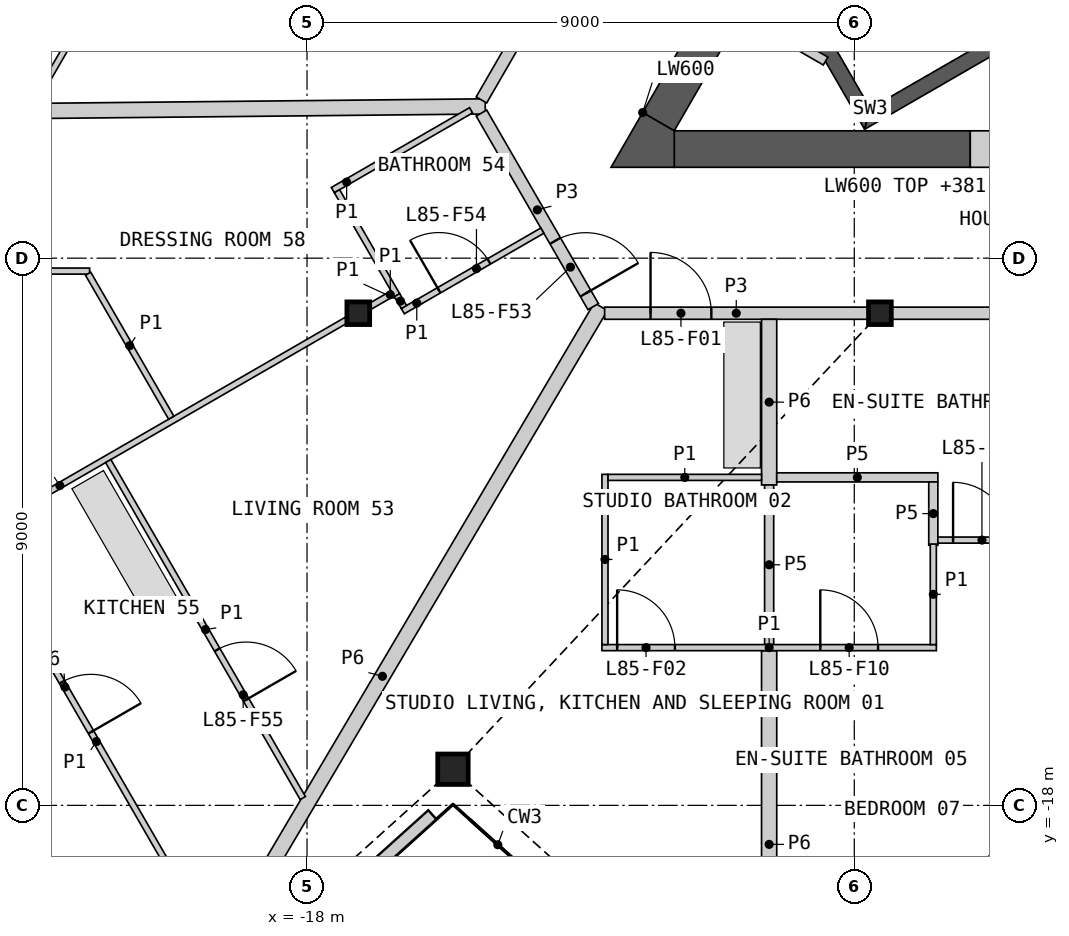
"""IFC4 building model, lengths in metres.
Left out: names, types, materials, properties, quantities, classifications, styles, units other than length and angle.
Written with IfcOpenShell. Run it as: python <this file> out.ifc"""

import sys

from ifc_helpers import new_model, si_unit, direction, frame, frame_2d, origin, origin_2d, place, context, subcontext, project, spatial, polyline, rectangle, hollow_rectangle, i_section, outline, extrude, element, fill, save


model = new_model("IFC4")
c1 = context("Model", 3, precision=1e-05, world=origin(), true_north=direction((0.0, 1.0)))
c2 = subcontext(c1, "Body", "Model", "MODEL_VIEW")
j1 = project(units=[si_unit("LENGTHUNIT", "METRE"), si_unit("PLANEANGLEUNIT", "RADIAN")], contexts=[c1])
p1 = place(None, origin())
s1 = spatial("IfcSite", under=j1, at=p1, CompositionType="ELEMENT")
p2 = place(p1, origin())
s2 = spatial("IfcBuilding", under=s1, at=p2, CompositionType="ELEMENT")
p3 = place(p2, frame((0.0, 0.0, 378.0)))
s3 = spatial("IfcBuildingStorey", under=s2, at=p3, CompositionType="ELEMENT", Elevation=378.0)
p4 = place(p3, frame((-15.6, -17.406, 0.0), z_axis=(0.0, 0.0, 1.0), x_axis=(1.0, 0.0, 0.0)))
e1 = element("IfcColumn", 1, at=p4, inside=s3, PredefinedType="COLUMN", context=c2, shape_type="SweptSolid", body=[
    extrude(hollow_rectangle(XDim=0.5, YDim=0.5, WallThickness=0.03, at=origin_2d()), origin(), (0.0, 0.0, 1.0), 3.4),
])
for number, where, z_axis, x_axis in (
    (2, (-17.157, -9.906, 0.0), (0.0, 0.0, 1.0), (1.0, 0.0, 0.0)),
    (3, (-8.578, -9.906, 0.0), (0.0, 0.0, 1.0), (1.0, 0.0, 0.0)),
):
    element("IfcColumn", number, at=place(p3, frame(where, z_axis=z_axis, x_axis=x_axis)), inside=s3, PredefinedType="COLUMN", context=c2, shape_type="SweptSolid", body=[
        extrude(i_section(OverallWidth=0.374, OverallDepth=0.372, WebThickness=0.016, FlangeThickness=0.026, at=origin_2d()), origin(), (0.0, 0.0, 1.0), 3.4),
    ])
p5 = place(p3, frame((-20.595, -22.346, 0.0), z_axis=(0.0, 0.0, 1.0), x_axis=(0.743137181878, 0.669139095339, 0.0)))
e4 = element("IfcWall", 4, at=p5, inside=s3, PredefinedType="SOLIDWALL", context=c2, shape_type="SweptSolid", body=[
    extrude(rectangle(XDim=6.265, YDim=0.2, at=frame_2d((3.133, 0.0))), origin(), (0.0, 0.0, 1.0), 2.634),
])
p6 = place(p5, frame((2.333, 0.0, 0.0)))
e5 = element("IfcOpeningElement", 5, at=p6, cuts=e4, PredefinedType="OPENING", context=c2, shape_type="SweptSolid", body=[
    extrude(rectangle(XDim=1.6, YDim=2.25, at=frame_2d((0.8, 1.125))), frame((0.0, 0.11, 0.0), z_axis=(0.0, -1.0, 0.0), x_axis=(1.0, 0.0, 0.0)), (0.0, 0.0, 1.0), 0.22),
])
p7 = place(p3, frame((-10.195, -22.346, 0.0), z_axis=(0.0, 0.0, 1.0), x_axis=(0.74313432117, 0.66914227239, 0.0)))
e6 = element("IfcWall", 6, at=p7, inside=s3, PredefinedType="SOLIDWALL", context=c2, shape_type="SweptSolid", body=[
    extrude(rectangle(XDim=6.609, YDim=0.2, at=frame_2d((3.304, 0.0))), origin(), (0.0, 0.0, 1.0), 2.634),
])
p8 = place(p7, frame((2.333, 0.0, 0.0)))
e7 = element("IfcOpeningElement", 7, at=p8, cuts=e6, PredefinedType="OPENING", context=c2, shape_type="SweptSolid", body=[
    extrude(rectangle(XDim=1.6, YDim=2.25, at=frame_2d((0.8, 1.125))), frame((0.0, 0.11, 0.0), z_axis=(0.0, -1.0, 0.0), x_axis=(1.0, 0.0, 0.0)), (0.0, 0.0, 1.0), 0.22),
])
p9 = place(p3, origin())
e8 = element("IfcWall", 8, at=p9, inside=s3, PredefinedType="SHEAR", context=c2, shape_type="SweptSolid", body=[
    extrude(outline(polyline([(-10.374, -4.206), (-8.83, -6.881), (-8.738, -6.539), (-10.032, -4.298), (-10.374, -4.206)])), origin(), (0.0, 0.0, 1.0), 3.1),
])
p10 = place(p3, origin())
e9 = element("IfcWall", 9, at=p10, inside=s3, PredefinedType="SHEAR", context=c2, shape_type="SweptSolid", body=[
    extrude(outline(polyline([(-8.738, -6.539), (-8.83, -6.881), (-3.763, -3.956), (-3.888, -3.739), (-8.738, -6.539)])), origin(), (0.0, 0.0, 1.0), 3.1),
])
p11 = place(p3, frame((-10.842, -4.967, 0.0), z_axis=(0.0, 0.0, 1.0), x_axis=(0.866098216386, -0.499873863663, 0.0)))
e10 = element("IfcWall", 10, at=p11, inside=s3, PredefinedType="PARTITIONING", context=c2, shape_type="SweptSolid", body=[
    extrude(rectangle(XDim=1.582, YDim=0.15, at=frame_2d((0.791, 0.0))), origin(), (0.0, 0.0, 1.0), 3.1),
])
p12 = place(p3, frame((-11.961, -7.206, 0.0), z_axis=(0.0, 0.0, 1.0), x_axis=(1.0, 0.0, 0.0)))
e11 = element("IfcWall", 11, at=p12, inside=s3, PredefinedType="SHEAR", context=c2, shape_type="SweptSolid", body=[
    extrude(rectangle(XDim=4.868, YDim=0.6, at=frame_2d((2.434, 0.0))), origin(), (0.0, 0.0, 1.0), 3.1),
])
p13 = place(p3, frame((-9.941, -2.807, 0.0), z_axis=(0.0, 0.0, 1.0), x_axis=(-0.500020646047, -0.866013483456, 0.0)))
e12 = element("IfcWall", 12, at=p13, inside=s3, PredefinedType="SHEAR", context=c2, shape_type="SweptSolid", body=[
    extrude(rectangle(XDim=4.559, YDim=0.6, at=frame_2d((2.28, 0.0))), origin(), (0.0, 0.0, 1.0), 3.1),
])
p14 = place(p3, origin())
e13 = element("IfcWall", 13, at=p14, inside=s3, PredefinedType="SHEAR", context=c2, shape_type="SweptSolid", body=[
    extrude(outline(polyline([(-12.48, -6.606), (-11.961, -6.906), (-11.961, -7.506), (-13.0, -7.506), (-12.48, -6.606)])), origin(), (0.0, 0.0, 1.0), 3.1),
])
p15 = place(p3, frame((-7.092, -7.206, 0.0), z_axis=(0.0, 0.0, 1.0), x_axis=(1.0, 0.0, 0.0)))
e14 = element("IfcWall", 14, at=p15, inside=s3, PredefinedType="SHEAR", context=c2, shape_type="SweptSolid", body=[
    extrude(rectangle(XDim=2.2, YDim=0.6, at=frame_2d((1.1, 0.0))), origin(), (0.0, 0.0, 1.0), 3.1),
])
p16 = place(p15, frame((0.6, 0.0, 0.0)))
e15 = element("IfcOpeningElement", 15, at=p16, cuts=e14, PredefinedType="OPENING", context=c2, shape_type="SweptSolid", body=[
    extrude(rectangle(XDim=1.0, YDim=2.1, at=frame_2d((0.5, 1.05))), frame((0.0, 0.31, 0.0), z_axis=(0.0, -1.0, 0.0), x_axis=(1.0, 0.0, 0.0)), (0.0, 0.0, 1.0), 0.62),
])
p17 = place(p3, frame((-29.883, -6.654, 0.0), z_axis=(0.0, 0.0, 1.0), x_axis=(0.999949143254, 0.010085182526, 0.0)))
e16 = element("IfcWall", 16, at=p17, inside=s3, PredefinedType="PARTITIONING", context=c2, shape_type="SweptSolid", body=[
    extrude(rectangle(XDim=14.815, YDim=0.25, at=frame_2d((7.408, 0.0))), origin(), (0.0, 0.0, 1.0), 2.33),
])
p18 = place(p3, frame((-20.351, -21.956, 0.0), z_axis=(0.0, 0.0, 1.0), x_axis=(0.508713003719, 0.860936164793, 0.0)))
e17 = element("IfcWall", 17, at=p18, inside=s3, PredefinedType="PARTITIONING", context=c2, shape_type="SweptSolid", body=[
    extrude(rectangle(XDim=14.122, YDim=0.25, at=frame_2d((7.061, 0.0))), origin(), (0.0, 0.0, 1.0), 2.33),
])
p19 = place(p3, frame((-8.382, -9.906, 0.0), z_axis=(0.0, 0.0, 1.0), x_axis=(1.0, 0.0, 0.0)))
e18 = element("IfcWall", 18, at=p19, inside=s3, PredefinedType="PARTITIONING", context=c2, shape_type="SweptSolid", body=[
    extrude(rectangle(XDim=8.185, YDim=0.2, at=frame_2d((4.092, 0.0))), origin(), (0.0, 0.0, 1.0), 3.1),
])
p20 = place(p19, frame((6.023, 0.0, 0.0)))
e19 = element("IfcOpeningElement", 19, at=p20, cuts=e18, PredefinedType="OPENING", context=c2, shape_type="SweptSolid", body=[
    extrude(rectangle(XDim=1.0, YDim=2.1, at=frame_2d((0.5, 1.05))), frame((0.0, 0.11, 0.0), z_axis=(0.0, -1.0, 0.0), x_axis=(1.0, 0.0, 0.0)), (0.0, 0.0, 1.0), 0.22),
])
p21 = place(p3, frame((-10.4, -21.828, 0.0), z_axis=(0.0, 0.0, 1.0), x_axis=(0.0, 1.0, 0.0)))
e20 = element("IfcWall", 20, at=p21, inside=s3, PredefinedType="PARTITIONING", context=c2, shape_type="SweptSolid", body=[
    extrude(rectangle(XDim=6.372, YDim=0.25, at=frame_2d((3.186, 0.0))), origin(), (0.0, 0.0, 1.0), 2.33),
])
p22 = place(p3, frame((-13.106, -9.906, 0.0), z_axis=(0.0, 0.0, 1.0), x_axis=(1.0, 0.0, 0.0)))
e21 = element("IfcWall", 21, at=p22, inside=s3, PredefinedType="PARTITIONING", context=c2, shape_type="SweptSolid", body=[
    extrude(rectangle(XDim=4.331, YDim=0.2, at=frame_2d((2.165, 0.0))), origin(), (0.0, 0.0, 1.0), 3.1),
])
p23 = place(p22, frame((0.755, 0.0, 0.0)))
e22 = element("IfcOpeningElement", 22, at=p23, cuts=e21, PredefinedType="OPENING", context=c2, shape_type="SweptSolid", body=[
    extrude(rectangle(XDim=1.0, YDim=2.1, at=frame_2d((0.5, 1.05))), frame((0.0, 0.11, 0.0), z_axis=(0.0, -1.0, 0.0), x_axis=(1.0, 0.0, 0.0)), (0.0, 0.0, 1.0), 0.22),
])
p24 = place(p3, frame((-15.131, -6.397, 0.0), z_axis=(0.0, 0.0, 1.0), x_axis=(0.499986217557, 0.866033360935, 0.0)))
e23 = element("IfcWall", 23, at=p24, inside=s3, PredefinedType="PARTITIONING", context=c2, shape_type="SweptSolid", body=[
    extrude(rectangle(XDim=4.3, YDim=0.2, at=frame_2d((2.15, 0.0))), origin(), (0.0, 0.0, 1.0), 3.1),
])
p25 = place(p3, frame((-15.131, -6.614, 0.0), z_axis=(0.0, 0.0, 1.0), x_axis=(0.499967746641, -0.866044024469, 0.0)))
e24 = element("IfcWall", 24, at=p25, inside=s3, PredefinedType="PARTITIONING", context=c2, shape_type="SweptSolid", body=[
    extrude(rectangle(XDim=3.676, YDim=0.2, at=frame_2d((1.838, 0.0))), origin(), (0.0, 0.0, 1.0), 3.1),
])
p26 = place(p25, frame((2.426, 0.0, 0.0)))
e25 = element("IfcOpeningElement", 25, at=p26, cuts=e24, PredefinedType="OPENING", context=c2, shape_type="SweptSolid", body=[
    extrude(rectangle(XDim=1.0, YDim=2.1, at=frame_2d((0.5, 1.05))), frame((0.0, 0.11, 0.0), z_axis=(0.0, -1.0, 0.0), x_axis=(1.0, 0.0, 0.0)), (0.0, 0.0, 1.0), 0.22),
])
p27 = place(p3, frame((-10.4, -12.731, 0.0), z_axis=(0.0, 0.0, 1.0), x_axis=(0.0, 1.0, 0.0)))
e26 = element("IfcWall", 26, at=p27, inside=s3, PredefinedType="PARTITIONING", context=c2, shape_type="SweptSolid", body=[
    extrude(rectangle(XDim=2.725, YDim=0.25, at=frame_2d((1.363, 0.0))), origin(), (0.0, 0.0, 1.0), 2.33),
])
p28 = place(p3, frame((-10.4, -15.356, 0.0), z_axis=(0.0, 0.0, 1.0), x_axis=(0.0, 1.0, 0.0)))
e27 = element("IfcWall", 27, at=p28, inside=s3, PredefinedType="PLUMBINGWALL", context=c2, shape_type="SweptSolid", body=[
    extrude(rectangle(XDim=2.625, YDim=0.15, at=frame_2d((1.312, 0.0))), origin(), (0.0, 0.0, 1.0), 2.33),
])
p29 = place(p3, frame((-10.275, -12.606, 0.0), z_axis=(0.0, 0.0, 1.0), x_axis=(1.0, 0.0, 0.0)))
e28 = element("IfcWall", 28, at=p29, inside=s3, PredefinedType="PLUMBINGWALL", context=c2, shape_type="SweptSolid", body=[
    extrude(rectangle(XDim=2.65, YDim=0.15, at=frame_2d((1.325, 0.0))), origin(), (0.0, 0.0, 1.0), 2.33),
])
p30 = place(p3, frame((-7.7, -13.722, 0.0), z_axis=(0.0, 0.0, 1.0), x_axis=(0.0, 1.0, 0.0)))
e29 = element("IfcWall", 29, at=p30, inside=s3, PredefinedType="PLUMBINGWALL", context=c2, shape_type="SweptSolid", body=[
    extrude(rectangle(XDim=1.042, YDim=0.15, at=frame_2d((0.521, 0.0))), origin(), (0.0, 0.0, 1.0), 2.33),
])
p31 = place(p3, frame((-26.777, -15.46, 0.0), z_axis=(0.0, 0.0, 1.0), x_axis=(0.866019680922, 0.500009912158, 0.0)))
e30 = element("IfcWall", 30, at=p31, inside=s3, PredefinedType="PARTITIONING", context=c2, shape_type="SweptSolid", body=[
    extrude(rectangle(XDim=10.881, YDim=0.1, at=frame_2d((5.44, 0.0))), origin(), (0.0, 0.0, 1.0), 2.33),
])
p32 = place(p31, frame((1.454, 0.0, 0.0)))
e31 = element("IfcOpeningElement", 31, at=p32, cuts=e30, PredefinedType="OPENING", context=c2, shape_type="SweptSolid", body=[
    extrude(rectangle(XDim=0.95, YDim=2.1, at=frame_2d((0.475, 1.05))), frame((0.0, 0.06, 0.0), z_axis=(0.0, -1.0, 0.0), x_axis=(1.0, 0.0, 0.0)), (0.0, 0.0, 1.0), 0.12),
])
p33 = place(p3, frame((-23.413, -13.575, 0.0), z_axis=(0.0, 0.0, 1.0), x_axis=(0.499998958472, -0.86602600511, 0.0)))
e32 = element("IfcWall", 32, at=p33, inside=s3, PredefinedType="PARTITIONING", context=c2, shape_type="SweptSolid", body=[
    extrude(rectangle(XDim=7.796, YDim=0.1, at=frame_2d((3.898, 0.0))), origin(), (0.0, 0.0, 1.0), 2.33),
])
p34 = place(p33, frame((2.768, 0.0, 0.0)))
e33 = element("IfcOpeningElement", 33, at=p34, cuts=e32, PredefinedType="OPENING", context=c2, shape_type="SweptSolid", body=[
    extrude(rectangle(XDim=0.95, YDim=2.1, at=frame_2d((0.475, 1.05))), frame((0.0, 0.06, 0.0), z_axis=(0.0, -1.0, 0.0), x_axis=(1.0, 0.0, 0.0)), (0.0, 0.0, 1.0), 0.12),
])
p35 = place(p3, frame((-22.505, -6.472, 0.0), z_axis=(0.0, 0.0, 1.0), x_axis=(0.499999516514, 0.866025682925, 0.0)))
e34 = element("IfcWall", 34, at=p35, inside=s3, PredefinedType="PARTITIONING", context=c2, shape_type="SweptSolid", body=[
    extrude(rectangle(XDim=6.407, YDim=0.1, at=frame_2d((3.204, 0.0))), origin(), (0.0, 0.0, 1.0), 2.33),
])
p36 = place(p35, frame((2.981, 0.0, 0.0)))
e35 = element("IfcOpeningElement", 35, at=p36, cuts=e34, PredefinedType="OPENING", context=c2, shape_type="SweptSolid", body=[
    extrude(rectangle(XDim=0.95, YDim=2.1, at=frame_2d((0.475, 1.05))), frame((0.0, 0.06, 0.0), z_axis=(0.0, -1.0, 0.0), x_axis=(1.0, 0.0, 0.0)), (0.0, 0.0, 1.0), 0.12),
])
p37 = place(p3, frame((-21.269, -12.337, 0.0), z_axis=(0.0, 0.0, 1.0), x_axis=(0.499983315828, -0.866035036182, 0.0)))
e36 = element("IfcWall", 36, at=p37, inside=s3, PredefinedType="PARTITIONING", context=c2, shape_type="SweptSolid", body=[
    extrude(rectangle(XDim=6.4, YDim=0.1, at=frame_2d((3.2, 0.0))), origin(), (0.0, 0.0, 1.0), 2.33),
])
p38 = place(p37, frame((3.584, 0.0, 0.0)))
e37 = element("IfcOpeningElement", 37, at=p38, cuts=e36, PredefinedType="OPENING", context=c2, shape_type="SweptSolid", body=[
    extrude(rectangle(XDim=0.95, YDim=2.1, at=frame_2d((0.475, 1.05))), frame((0.0, 0.06, 0.0), z_axis=(0.0, -1.0, 0.0), x_axis=(1.0, 0.0, 0.0)), (0.0, 0.0, 1.0), 0.12),
])
p39 = place(p3, frame((-13.15, -15.406, 0.0), z_axis=(0.0, 0.0, 1.0), x_axis=(1.0, 0.0, 0.0)))
e38 = element("IfcWall", 38, at=p39, inside=s3, PredefinedType="PARTITIONING", context=c2, shape_type="SweptSolid", body=[
    extrude(rectangle(XDim=5.5, YDim=0.1, at=frame_2d((2.75, 0.0))), origin(), (0.0, 0.0, 1.0), 2.33),
])
p40 = place(p39, frame((0.25, 0.0, 0.0)))
e39 = element("IfcOpeningElement", 39, at=p40, cuts=e38, PredefinedType="OPENING", context=c2, shape_type="SweptSolid", body=[
    extrude(rectangle(XDim=0.95, YDim=2.1, at=frame_2d((0.475, 1.05))), frame((0.0, 0.06, 0.0), z_axis=(0.0, -1.0, 0.0), x_axis=(1.0, 0.0, 0.0)), (0.0, 0.0, 1.0), 0.12),
])
p41 = place(p39, frame((3.591, 0.0, 0.0)))
e40 = element("IfcOpeningElement", 40, at=p41, cuts=e38, PredefinedType="OPENING", context=c2, shape_type="SweptSolid", body=[
    extrude(rectangle(XDim=0.95, YDim=2.1, at=frame_2d((0.475, 1.05))), frame((0.0, 0.06, 0.0), z_axis=(0.0, -1.0, 0.0), x_axis=(1.0, 0.0, 0.0)), (0.0, 0.0, 1.0), 0.12),
])
p42 = place(p3, frame((-24.801, -9.212, 0.0), z_axis=(0.0, 0.0, 1.0), x_axis=(1.0, 0.0, 0.0)))
e41 = element("IfcWall", 41, at=p42, inside=s3, PredefinedType="PARTITIONING", context=c2, shape_type="SweptSolid", body=[
    extrude(rectangle(XDim=3.226, YDim=0.1, at=frame_2d((1.613, 0.0))), origin(), (0.0, 0.0, 1.0), 2.33),
])
p43 = place(p42, frame((0.354, 0.0, 0.0)))
e42 = element("IfcOpeningElement", 42, at=p43, cuts=e41, PredefinedType="OPENING", context=c2, shape_type="SweptSolid", body=[
    extrude(rectangle(XDim=0.95, YDim=2.1, at=frame_2d((0.475, 1.05))), frame((0.0, 0.06, 0.0), z_axis=(0.0, -1.0, 0.0), x_axis=(1.0, 0.0, 0.0)), (0.0, 0.0, 1.0), 0.12),
])
p44 = place(p3, frame((-21.6, -9.256, 0.0), z_axis=(0.0, 0.0, 1.0), x_axis=(0.500018733116, -0.866014587945, 0.0)))
e43 = element("IfcWall", 43, at=p44, inside=s3, PredefinedType="PARTITIONING", context=c2, shape_type="SweptSolid", body=[
    extrude(rectangle(XDim=2.734, YDim=0.1, at=frame_2d((1.367, 0.0))), origin(), (0.0, 0.0, 1.0), 2.33),
])
p45 = place(p3, frame((-13.1, -15.356, 0.0), z_axis=(0.0, 0.0, 1.0), x_axis=(0.0, 1.0, 0.0)))
e44 = element("IfcWall", 44, at=p45, inside=s3, PredefinedType="PARTITIONING", context=c2, shape_type="SweptSolid", body=[
    extrude(rectangle(XDim=2.8, YDim=0.1, at=frame_2d((1.4, 0.0))), origin(), (0.0, 0.0, 1.0), 2.33),
])
p46 = place(p3, frame((-17.575, -7.881, 0.0), z_axis=(0.0, 0.0, 1.0), x_axis=(0.866036909293, 0.499980071345, 0.0)))
e45 = element("IfcWall", 45, at=p46, inside=s3, PredefinedType="PARTITIONING", context=c2, shape_type="SweptSolid", body=[
    extrude(rectangle(XDim=2.625, YDim=0.1, at=frame_2d((1.312, 0.0))), origin(), (0.0, 0.0, 1.0), 2.33),
])
p47 = place(p3, frame((-13.05, -12.606, 0.0), z_axis=(0.0, 0.0, 1.0), x_axis=(1.0, 0.0, 0.0)))
e46 = element("IfcWall", 46, at=p47, inside=s3, PredefinedType="PARTITIONING", context=c2, shape_type="SweptSolid", body=[
    extrude(rectangle(XDim=2.525, YDim=0.1, at=frame_2d((1.263, 0.0))), origin(), (0.0, 0.0, 1.0), 2.33),
])
p48 = place(p3, frame((-16.425, -9.872, 0.0), z_axis=(0.0, 0.0, 1.0), x_axis=(0.86603978909, 0.499975083092, 0.0)))
e47 = element("IfcWall", 47, at=p48, inside=s3, PredefinedType="PARTITIONING", context=c2, shape_type="SweptSolid", body=[
    extrude(rectangle(XDim=2.649, YDim=0.1, at=frame_2d((1.325, 0.0))), origin(), (0.0, 0.0, 1.0), 2.33),
])
p49 = place(p48, frame((0.686, 0.0, 0.0)))
e48 = element("IfcOpeningElement", 48, at=p49, cuts=e47, PredefinedType="OPENING", context=c2, shape_type="SweptSolid", body=[
    extrude(rectangle(XDim=0.95, YDim=2.1, at=frame_2d((0.475, 1.05))), frame((0.0, 0.06, 0.0), z_axis=(0.0, -1.0, 0.0), x_axis=(1.0, 0.0, 0.0)), (0.0, 0.0, 1.0), 0.12),
])
p50 = place(p3, frame((-7.625, -13.637, 0.0), z_axis=(0.0, 0.0, 1.0), x_axis=(1.0, 0.0, 0.0)))
e49 = element("IfcWall", 49, at=p50, inside=s3, PredefinedType="PARTITIONING", context=c2, shape_type="SweptSolid", body=[
    extrude(rectangle(XDim=2.375, YDim=0.1, at=frame_2d((1.188, 0.0))), origin(), (0.0, 0.0, 1.0), 2.33),
])
p51 = place(p50, frame((0.25, 0.0, 0.0)))
e50 = element("IfcOpeningElement", 50, at=p51, cuts=e49, PredefinedType="OPENING", context=c2, shape_type="SweptSolid", body=[
    extrude(rectangle(XDim=0.95, YDim=2.1, at=frame_2d((0.475, 1.05))), frame((0.0, 0.06, 0.0), z_axis=(0.0, -1.0, 0.0), x_axis=(1.0, 0.0, 0.0)), (0.0, 0.0, 1.0), 0.12),
])
p52 = place(p3, frame((-17.507, -7.899, 0.0), z_axis=(0.0, 0.0, 1.0), x_axis=(0.500011643316, -0.866018681408, 0.0)))
e51 = element("IfcWall", 51, at=p52, inside=s3, PredefinedType="PARTITIONING", context=c2, shape_type="SweptSolid", body=[
    extrude(rectangle(XDim=1.973, YDim=0.1, at=frame_2d((0.987, 0.0))), origin(), (0.0, 0.0, 1.0), 2.33),
])
p53 = place(p3, frame((-7.7, -15.356, 0.0), z_axis=(0.0, 0.0, 1.0), x_axis=(0.0, 1.0, 0.0)))
e52 = element("IfcWall", 52, at=p53, inside=s3, PredefinedType="PARTITIONING", context=c2, shape_type="SweptSolid", body=[
    extrude(rectangle(XDim=1.654, YDim=0.1, at=frame_2d((0.827, 0.0))), origin(), (0.0, 0.0, 1.0), 2.33),
])
p54 = place(p3, frame((-16.96, -9.792, 0.0), z_axis=(0.0, 0.0, 1.0), x_axis=(0.866137484628, 0.499805820016, 0.0)))
e53 = element("IfcWall", 53, at=p54, inside=s3, PredefinedType="PARTITIONING", context=c2, shape_type="SweptSolid", body=[
    extrude(rectangle(XDim=0.423, YDim=0.1, at=frame_2d((0.211, 0.0))), origin(), (0.0, 0.0, 1.0), 2.33),
])
p55 = place(p3, frame((-16.519, -9.61, 0.0), z_axis=(0.0, 0.0, 1.0), x_axis=(0.50245032488, -0.864606078528, 0.0)))
e54 = element("IfcWall", 54, at=p55, inside=s3, PredefinedType="PARTITIONING", context=c2, shape_type="SweptSolid", body=[
    extrude(rectangle(XDim=0.224, YDim=0.1, at=frame_2d((0.112, 0.0))), origin(), (0.0, 0.0, 1.0), 2.33),
])
p56 = place(p23, origin())
e55 = element("IfcDoor", 55, at=p56, inside=s3, OperationType="SINGLE_SWING_LEFT", PredefinedType="DOOR", context=c2, shape_type="SweptSolid", body=[
    extrude(rectangle(XDim=1.0, YDim=2.1, at=frame_2d((0.5, 1.05))), frame((0.0, 0.025, 0.0), z_axis=(0.0, -1.0, 0.0), x_axis=(1.0, 0.0, 0.0)), (0.0, 0.0, 1.0), 0.05),
])
fill(e22, e55)
p57 = place(p40, origin())
e56 = element("IfcDoor", 56, at=p57, inside=s3, OperationType="SINGLE_SWING_LEFT", PredefinedType="DOOR", context=c2, shape_type="SweptSolid", body=[
    extrude(rectangle(XDim=0.95, YDim=2.1, at=frame_2d((0.475, 1.05))), frame((0.0, 0.025, 0.0), z_axis=(0.0, -1.0, 0.0), x_axis=(1.0, 0.0, 0.0)), (0.0, 0.0, 1.0), 0.05),
])
fill(e39, e56)
p58 = place(p51, origin())
e57 = element("IfcDoor", 57, at=p58, inside=s3, OperationType="SINGLE_SWING_LEFT", PredefinedType="DOOR", context=c2, shape_type="SweptSolid", body=[
    extrude(rectangle(XDim=0.95, YDim=2.1, at=frame_2d((0.475, 1.05))), frame((0.0, 0.025, 0.0), z_axis=(0.0, -1.0, 0.0), x_axis=(1.0, 0.0, 0.0)), (0.0, 0.0, 1.0), 0.05),
])
fill(e50, e57)
p59 = place(p41, origin())
e58 = element("IfcDoor", 58, at=p59, inside=s3, OperationType="SINGLE_SWING_LEFT", PredefinedType="DOOR", context=c2, shape_type="SweptSolid", body=[
    extrude(rectangle(XDim=0.95, YDim=2.1, at=frame_2d((0.475, 1.05))), frame((0.0, 0.025, 0.0), z_axis=(0.0, -1.0, 0.0), x_axis=(1.0, 0.0, 0.0)), (0.0, 0.0, 1.0), 0.05),
])
fill(e40, e58)
p60 = place(p26, origin())
e59 = element("IfcDoor", 59, at=p60, inside=s3, OperationType="SINGLE_SWING_RIGHT", PredefinedType="DOOR", context=c2, shape_type="SweptSolid", body=[
    extrude(rectangle(XDim=1.0, YDim=2.1, at=frame_2d((0.5, 1.05))), frame((0.0, 0.025, 0.0), z_axis=(0.0, -1.0, 0.0), x_axis=(1.0, 0.0, 0.0)), (0.0, 0.0, 1.0), 0.05),
])
fill(e25, e59)
p61 = place(p49, origin())
e60 = element("IfcDoor", 60, at=p61, inside=s3, OperationType="SINGLE_SWING_LEFT", PredefinedType="DOOR", context=c2, shape_type="SweptSolid", body=[
    extrude(rectangle(XDim=0.95, YDim=2.1, at=frame_2d((0.475, 1.05))), frame((0.0, 0.025, 0.0), z_axis=(0.0, -1.0, 0.0), x_axis=(1.0, 0.0, 0.0)), (0.0, 0.0, 1.0), 0.05),
])
fill(e48, e60)
p62 = place(p38, origin())
e61 = element("IfcDoor", 61, at=p62, inside=s3, OperationType="SINGLE_SWING_RIGHT", PredefinedType="DOOR", context=c2, shape_type="SweptSolid", body=[
    extrude(rectangle(XDim=0.95, YDim=2.1, at=frame_2d((0.475, 1.05))), frame((0.0, 0.025, 0.0), z_axis=(0.0, -1.0, 0.0), x_axis=(1.0, 0.0, 0.0)), (0.0, 0.0, 1.0), 0.05),
])
fill(e37, e61)
p63 = place(p34, origin())
e62 = element("IfcDoor", 62, at=p63, inside=s3, OperationType="SINGLE_SWING_RIGHT", PredefinedType="DOOR", context=c2, shape_type="SweptSolid", body=[
    extrude(rectangle(XDim=0.95, YDim=2.1, at=frame_2d((0.475, 1.05))), frame((0.0, 0.025, 0.0), z_axis=(0.0, -1.0, 0.0), x_axis=(1.0, 0.0, 0.0)), (0.0, 0.0, 1.0), 0.05),
])
fill(e33, e62)
save(model, sys.argv[1])
